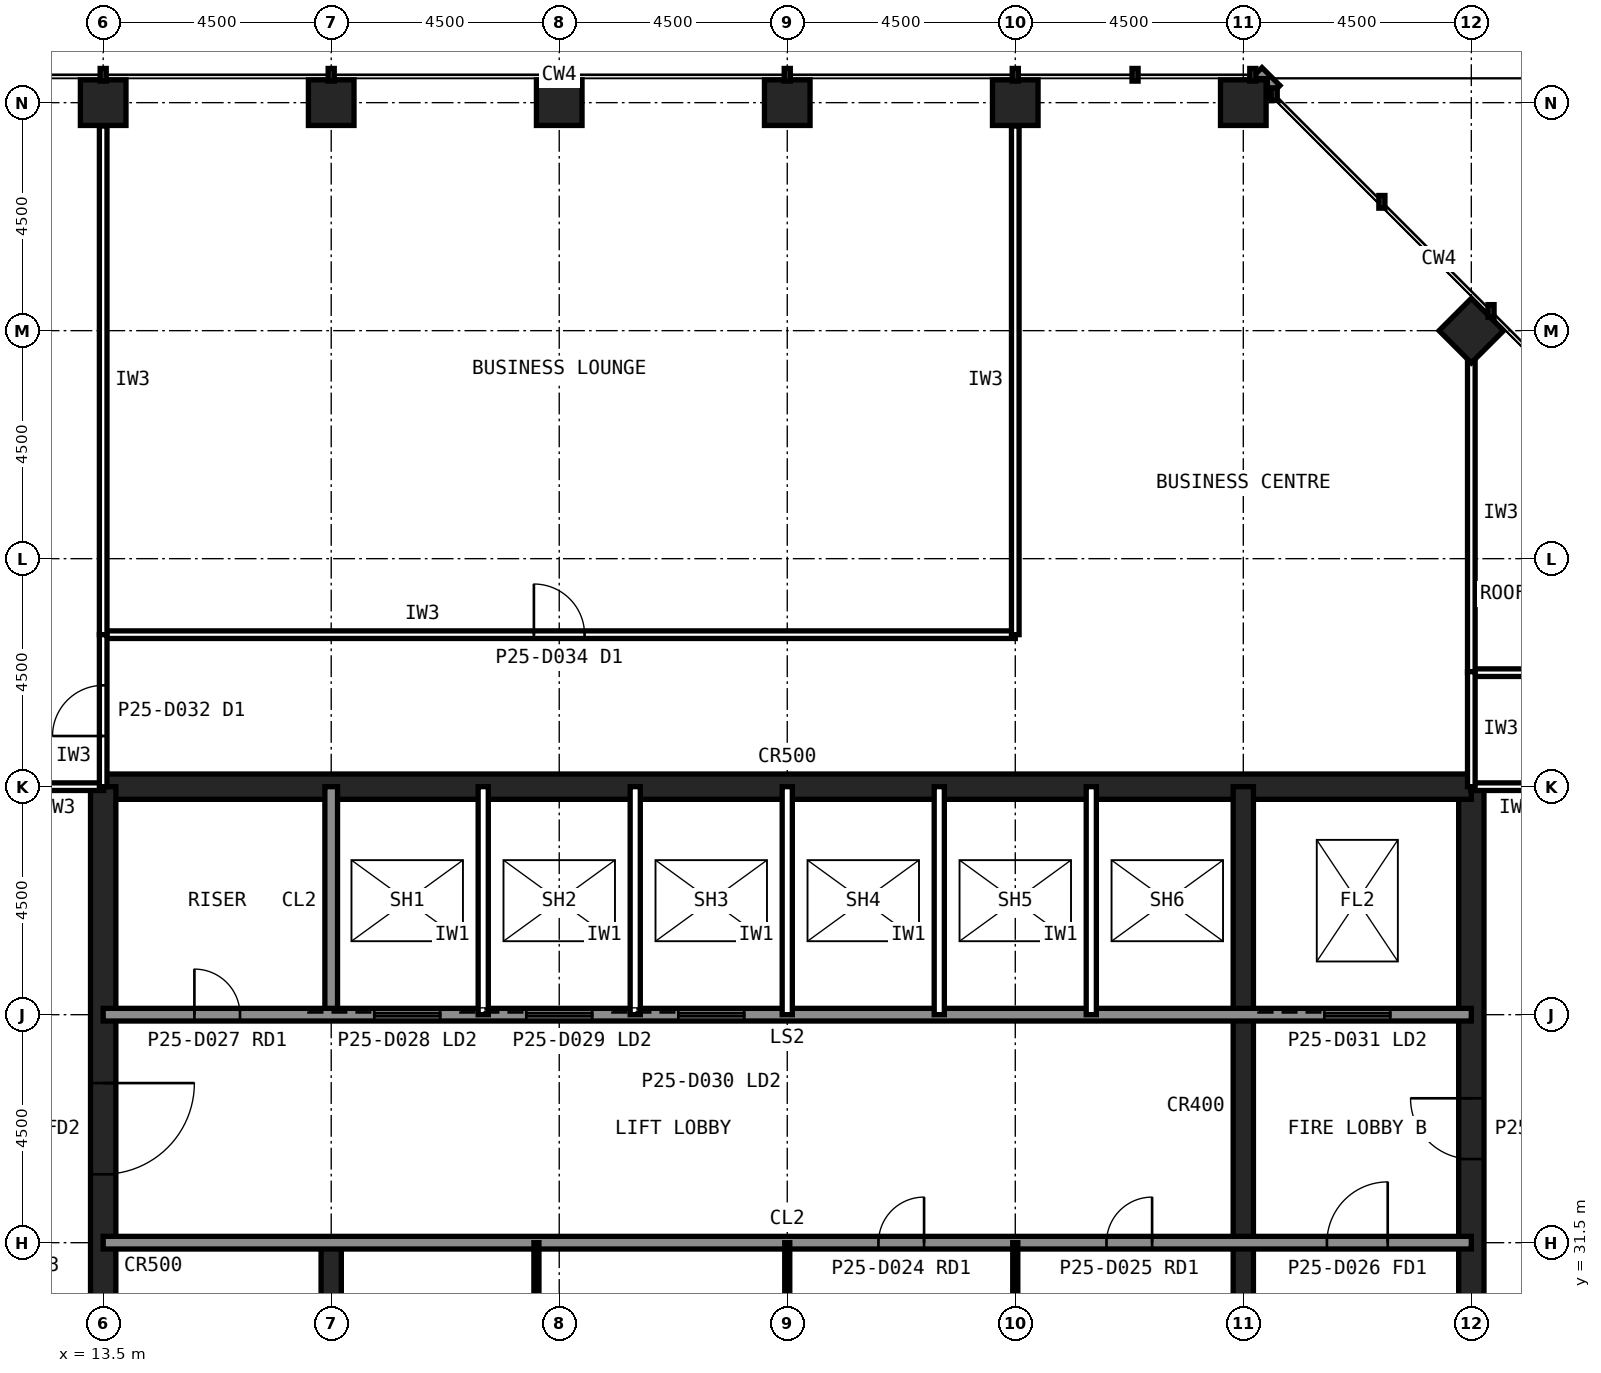
"""IFC4 building model, lengths in metres.
Left out: names, types, materials, properties, quantities, classifications, styles, units other than length and angle.
Written with IfcOpenShell. Run it as: python <this file> out.ifc"""

import sys

from ifc_helpers import new_model, si_unit, direction, frame, frame_2d, origin, origin_2d, place, context, subcontext, project, spatial, rectangle, hollow_rectangle, extrude, element, fill, save


model = new_model("IFC4")
c1 = context("Model", 3, precision=1e-05, world=origin(), true_north=direction((0.0, 1.0)))
c2 = subcontext(c1, "Body", "Model", "MODEL_VIEW")
j1 = project(units=[si_unit("LENGTHUNIT", "METRE"), si_unit("PLANEANGLEUNIT", "RADIAN")], contexts=[c1])
p1 = place(None, origin())
s1 = spatial("IfcSite", under=j1, at=p1, CompositionType="ELEMENT")
p2 = place(p1, origin())
s2 = spatial("IfcBuilding", under=s1, at=p2, CompositionType="ELEMENT")
p3 = place(p2, frame((0.0, 0.0, 110.6)))
s3 = spatial("IfcBuildingStorey", under=s2, at=p3, CompositionType="ELEMENT", Elevation=110.6)
for number, where, z_axis, x_axis in (
    (1, (36.0, 54.0, 0.0), (0.0, 0.0, 1.0), (1.0, 0.0, 0.0)),
    (2, (31.5, 54.0, 0.0), (0.0, 0.0, 1.0), (1.0, 0.0, 0.0)),
    (3, (27.0, 54.0, 0.0), (0.0, 0.0, 1.0), (1.0, 0.0, 0.0)),
    (4, (22.5, 54.0, 0.0), (0.0, 0.0, 1.0), (1.0, 0.0, 0.0)),
    (5, (18.0, 54.0, 0.0), (0.0, 0.0, 1.0), (1.0, 0.0, 0.0)),
    (6, (13.5, 54.0, 0.0), (0.0, 0.0, 1.0), (1.0, 0.0, 0.0)),
    (7, (40.5, 49.5, 0.0), (0.0, 0.0, 1.0), (0.707, 0.707, 0.0)),
):
    element("IfcColumn", number, at=place(p3, frame(where, z_axis=z_axis, x_axis=x_axis)), inside=s3, PredefinedType="COLUMN", context=c2, shape_type="SweptSolid", body=[
        extrude(hollow_rectangle(XDim=0.9, YDim=0.9, WallThickness=0.063, at=origin_2d()), origin(), (0.0, 0.0, 1.0), 5.0),
    ])
p4 = place(p3, frame((40.5, 13.5, 0.0), z_axis=(0.0, 0.0, 1.0), x_axis=(0.0, 1.0, 0.0)))
e8 = element("IfcWall", 8, at=p4, inside=s3, PredefinedType="SHEAR", context=c2, shape_type="SweptSolid", body=[
    extrude(rectangle(XDim=27.0, YDim=0.5, at=frame_2d((13.5, 0.0))), origin(), (0.0, 0.0, 1.0), 5.0),
])
p5 = place(p4, frame((5.85, 0.0, 0.0)))
e9 = element("IfcOpeningElement", 9, at=p5, cuts=e8, PredefinedType="OPENING", context=c2, shape_type="SweptSolid", body=[
    extrude(rectangle(XDim=1.8, YDim=2.1, at=frame_2d((0.9, 1.05))), frame((0.0, 0.26, 0.0), z_axis=(0.0, -1.0, 0.0), x_axis=(1.0, 0.0, 0.0)), (0.0, 0.0, 1.0), 0.52),
])
p6 = place(p4, frame((19.65, 0.0, 0.0)))
e10 = element("IfcOpeningElement", 10, at=p6, cuts=e8, PredefinedType="OPENING", context=c2, shape_type="SweptSolid", body=[
    extrude(rectangle(XDim=1.2, YDim=2.1, at=frame_2d((0.6, 1.05))), frame((0.0, 0.26, 0.0), z_axis=(0.0, -1.0, 0.0), x_axis=(1.0, 0.0, 0.0)), (0.0, 0.0, 1.0), 0.52),
])
p7 = place(p3, frame((40.5, 40.5, 0.0), z_axis=(0.0, 0.0, 1.0), x_axis=(-1.0, 0.0, 0.0)))
e11 = element("IfcWall", 11, at=p7, inside=s3, PredefinedType="SHEAR", context=c2, shape_type="SweptSolid", body=[
    extrude(rectangle(XDim=27.0, YDim=0.5, at=frame_2d((13.5, 0.0))), origin(), (0.0, 0.0, 1.0), 5.0),
])
p8 = place(p3, frame((13.5, 40.5, 0.0), z_axis=(0.0, 0.0, 1.0), x_axis=(0.0, -1.0, 0.0)))
e12 = element("IfcWall", 12, at=p8, inside=s3, PredefinedType="SHEAR", context=c2, shape_type="SweptSolid", body=[
    extrude(rectangle(XDim=27.0, YDim=0.5, at=frame_2d((13.5, 0.0))), origin(), (0.0, 0.0, 1.0), 5.0),
])
p9 = place(p8, frame((19.65, 0.0, 0.0)))
e13 = element("IfcOpeningElement", 13, at=p9, cuts=e12, PredefinedType="OPENING", context=c2, shape_type="SweptSolid", body=[
    extrude(rectangle(XDim=1.2, YDim=2.1, at=frame_2d((0.6, 1.05))), frame((0.0, 0.26, 0.0), z_axis=(0.0, -1.0, 0.0), x_axis=(1.0, 0.0, 0.0)), (0.0, 0.0, 1.0), 0.52),
])
p10 = place(p8, frame((5.85, 0.0, 0.0)))
e14 = element("IfcOpeningElement", 14, at=p10, cuts=e12, PredefinedType="OPENING", context=c2, shape_type="SweptSolid", body=[
    extrude(rectangle(XDim=1.8, YDim=2.1, at=frame_2d((0.9, 1.05))), frame((0.0, 0.26, 0.0), z_axis=(0.0, -1.0, 0.0), x_axis=(1.0, 0.0, 0.0)), (0.0, 0.0, 1.0), 0.52),
])
p11 = place(p3, frame((18.0, 13.5, 0.0), z_axis=(0.0, 0.0, 1.0), x_axis=(0.0, 1.0, 0.0)))
e15 = element("IfcWall", 15, at=p11, inside=s3, PredefinedType="SHEAR", context=c2, shape_type="SweptSolid", body=[
    extrude(rectangle(XDim=18.0, YDim=0.4, at=frame_2d((9.0, 0.0))), origin(), (0.0, 0.0, 1.0), 5.0),
])
p12 = place(p3, frame((18.0, 36.0, 0.0), z_axis=(0.0, 0.0, 1.0), x_axis=(0.0, 1.0, 0.0)))
e16 = element("IfcWall", 16, at=p12, inside=s3, PredefinedType="SOLIDWALL", context=c2, shape_type="SweptSolid", body=[
    extrude(rectangle(XDim=4.5, YDim=0.25, at=frame_2d((2.25, 0.0))), origin(), (0.0, 0.0, 1.0), 4.84),
])
p13 = place(p3, frame((36.0, 22.5, 0.0), z_axis=(0.0, 0.0, 1.0), x_axis=(0.0, 1.0, 0.0)))
e17 = element("IfcWall", 17, at=p13, inside=s3, PredefinedType="SHEAR", context=c2, shape_type="SweptSolid", body=[
    extrude(rectangle(XDim=18.0, YDim=0.4, at=frame_2d((9.0, 0.0))), origin(), (0.0, 0.0, 1.0), 5.0),
])
p14 = place(p3, frame((13.5, 36.0, 0.0), z_axis=(0.0, 0.0, 1.0), x_axis=(1.0, 0.0, 0.0)))
e18 = element("IfcWall", 18, at=p14, inside=s3, PredefinedType="SOLIDWALL", context=c2, shape_type="SweptSolid", body=[
    extrude(rectangle(XDim=27.0, YDim=0.25, at=frame_2d((13.5, 0.0))), origin(), (0.0, 0.0, 1.0), 4.84),
])
p15 = place(p14, frame((1.8, 0.0, 0.0)))
e19 = element("IfcOpeningElement", 19, at=p15, cuts=e18, PredefinedType="OPENING", context=c2, shape_type="SweptSolid", body=[
    extrude(rectangle(XDim=0.9, YDim=2.1, at=frame_2d((0.45, 1.05))), frame((0.0, 0.135, 0.0), z_axis=(0.0, -1.0, 0.0), x_axis=(1.0, 0.0, 0.0)), (0.0, 0.0, 1.0), 0.27),
])
p16 = place(p14, frame((5.35, 0.0, 0.0)))
e20 = element("IfcOpeningElement", 20, at=p16, cuts=e18, PredefinedType="OPENING", context=c2, shape_type="SweptSolid", body=[
    extrude(rectangle(XDim=1.3, YDim=2.2, at=frame_2d((0.65, 1.1))), frame((0.0, 0.135, 0.0), z_axis=(0.0, -1.0, 0.0), x_axis=(1.0, 0.0, 0.0)), (0.0, 0.0, 1.0), 0.27),
])
p17 = place(p14, frame((8.35, 0.0, 0.0)))
e21 = element("IfcOpeningElement", 21, at=p17, cuts=e18, PredefinedType="OPENING", context=c2, shape_type="SweptSolid", body=[
    extrude(rectangle(XDim=1.3, YDim=2.2, at=frame_2d((0.65, 1.1))), frame((0.0, 0.135, 0.0), z_axis=(0.0, -1.0, 0.0), x_axis=(1.0, 0.0, 0.0)), (0.0, 0.0, 1.0), 0.27),
])
p18 = place(p14, frame((11.35, 0.0, 0.0)))
e22 = element("IfcOpeningElement", 22, at=p18, cuts=e18, PredefinedType="OPENING", context=c2, shape_type="SweptSolid", body=[
    extrude(rectangle(XDim=1.3, YDim=2.2, at=frame_2d((0.65, 1.1))), frame((0.0, 0.135, 0.0), z_axis=(0.0, -1.0, 0.0), x_axis=(1.0, 0.0, 0.0)), (0.0, 0.0, 1.0), 0.27),
])
p19 = place(p14, frame((24.1, 0.0, 0.0)))
e23 = element("IfcOpeningElement", 23, at=p19, cuts=e18, PredefinedType="OPENING", context=c2, shape_type="SweptSolid", body=[
    extrude(rectangle(XDim=1.3, YDim=2.2, at=frame_2d((0.65, 1.1))), frame((0.0, 0.135, 0.0), z_axis=(0.0, -1.0, 0.0), x_axis=(1.0, 0.0, 0.0)), (0.0, 0.0, 1.0), 0.27),
])
p20 = place(p3, frame((13.5, 31.5, 0.0), z_axis=(0.0, 0.0, 1.0), x_axis=(1.0, 0.0, 0.0)))
e24 = element("IfcWall", 24, at=p20, inside=s3, PredefinedType="SOLIDWALL", context=c2, shape_type="SweptSolid", body=[
    extrude(rectangle(XDim=27.0, YDim=0.25, at=frame_2d((13.5, 0.0))), origin(), (0.0, 0.0, 1.0), 4.84),
])
p21 = place(p20, frame((24.15, 0.0, 0.0)))
e25 = element("IfcOpeningElement", 25, at=p21, cuts=e24, PredefinedType="OPENING", context=c2, shape_type="SweptSolid", body=[
    extrude(rectangle(XDim=1.2, YDim=2.1, at=frame_2d((0.6, 1.05))), frame((0.0, 0.135, 0.0), z_axis=(0.0, -1.0, 0.0), x_axis=(1.0, 0.0, 0.0)), (0.0, 0.0, 1.0), 0.27),
])
p22 = place(p20, frame((15.3, 0.0, 0.0)))
e26 = element("IfcOpeningElement", 26, at=p22, cuts=e24, PredefinedType="OPENING", context=c2, shape_type="SweptSolid", body=[
    extrude(rectangle(XDim=0.9, YDim=2.1, at=frame_2d((0.45, 1.05))), frame((0.0, 0.135, 0.0), z_axis=(0.0, -1.0, 0.0), x_axis=(1.0, 0.0, 0.0)), (0.0, 0.0, 1.0), 0.27),
])
p23 = place(p20, frame((19.8, 0.0, 0.0)))
e27 = element("IfcOpeningElement", 27, at=p23, cuts=e24, PredefinedType="OPENING", context=c2, shape_type="SweptSolid", body=[
    extrude(rectangle(XDim=0.9, YDim=2.1, at=frame_2d((0.45, 1.05))), frame((0.0, 0.135, 0.0), z_axis=(0.0, -1.0, 0.0), x_axis=(1.0, 0.0, 0.0)), (0.0, 0.0, 1.0), 0.27),
])
for number, where, z_axis, x_axis in (
    (28, (21.0, 36.0, 0.0), (0.0, 0.0, 1.0), (0.0, 1.0, 0.0)),
    (29, (24.0, 36.0, 0.0), (0.0, 0.0, 1.0), (0.0, 1.0, 0.0)),
    (30, (27.0, 36.0, 0.0), (0.0, 0.0, 1.0), (0.0, 1.0, 0.0)),
    (31, (30.0, 36.0, 0.0), (0.0, 0.0, 1.0), (0.0, 1.0, 0.0)),
    (32, (33.0, 36.0, 0.0), (0.0, 0.0, 1.0), (0.0, 1.0, 0.0)),
):
    element("IfcWall", number, at=place(p3, frame(where, z_axis=z_axis, x_axis=x_axis)), inside=s3, PredefinedType="PARTITIONING", context=c2, shape_type="SweptSolid", body=[
        extrude(rectangle(XDim=4.5, YDim=0.2, at=frame_2d((2.25, 0.0))), origin(), (0.0, 0.0, 1.0), 4.84),
    ])
for number, where, z_axis, x_axis in (
    (33, (22.05, 22.5, 0.0), (0.0, 0.0, 1.0), (0.0, 1.0, 0.0)),
    (34, (27.0, 22.5, 0.0), (0.0, 0.0, 1.0), (0.0, 1.0, 0.0)),
    (35, (31.5, 22.5, 0.0), (0.0, 0.0, 1.0), (0.0, 1.0, 0.0)),
):
    element("IfcWall", number, at=place(p3, frame(where, z_axis=z_axis, x_axis=x_axis)), inside=s3, PredefinedType="PLUMBINGWALL", context=c2, shape_type="SweptSolid", body=[
        extrude(rectangle(XDim=9.0, YDim=0.1, at=frame_2d((4.5, 0.0))), origin(), (0.0, 0.0, 1.0), 4.84),
    ])
for number, where, z_axis, x_axis in (
    (36, (13.51, 40.5, 0.0), (0.0, 0.0, 1.0), (-1.0, 0.0, 0.0)),
    (37, (42.3, 40.5, 0.0), (0.0, 0.0, 1.0), (-1.0, 0.0, 0.0)),
):
    element("IfcWall", number, at=place(p3, frame(where, z_axis=z_axis, x_axis=x_axis)), inside=s3, PredefinedType="PARTITIONING", context=c2, shape_type="SweptSolid", body=[
        extrude(rectangle(XDim=1.81, YDim=0.15, at=frame_2d((0.905, 0.0))), origin(), (0.0, 0.0, 1.0), 3.989),
    ])
p24 = place(p3, frame((13.5, 43.5, 0.0), z_axis=(0.0, 0.0, 1.0), x_axis=(1.0, 0.0, 0.0)))
e38 = element("IfcWall", 38, at=p24, inside=s3, PredefinedType="PARTITIONING", context=c2, shape_type="SweptSolid", body=[
    extrude(rectangle(XDim=18.0, YDim=0.15, at=frame_2d((9.0, 0.0))), origin(), (0.0, 0.0, 1.0), 4.84),
])
p25 = place(p24, frame((8.5, 0.0, 0.0)))
e39 = element("IfcOpeningElement", 39, at=p25, cuts=e38, PredefinedType="OPENING", context=c2, shape_type="SweptSolid", body=[
    extrude(rectangle(XDim=1.0, YDim=2.1, at=frame_2d((0.5, 1.05))), frame((0.0, 0.085, 0.0), z_axis=(0.0, -1.0, 0.0), x_axis=(1.0, 0.0, 0.0)), (0.0, 0.0, 1.0), 0.17),
])
for number, where, z_axis, x_axis in (
    (40, (31.5, 43.5, 0.0), (0.0, 0.0, 1.0), (0.0, 1.0, 0.0)),
    (41, (13.5, 53.54, 0.0), (0.0, 0.0, 1.0), (0.0, -1.0, 0.0)),
):
    element("IfcWall", number, at=place(p3, frame(where, z_axis=z_axis, x_axis=x_axis)), inside=s3, PredefinedType="PARTITIONING", context=c2, shape_type="SweptSolid", body=[
        extrude(rectangle(XDim=10.04, YDim=0.15, at=frame_2d((5.02, 0.0))), origin(), (0.0, 0.0, 1.0), 3.989),
    ])
p26 = place(p3, frame((40.5, 42.75, 0.0), z_axis=(0.0, 0.0, 1.0), x_axis=(1.0, 0.0, 0.0)))
e42 = element("IfcWall", 42, at=p26, inside=s3, PredefinedType="PARTITIONING", context=c2, shape_type="SweptSolid", body=[
    extrude(rectangle(XDim=7.485, YDim=0.15, at=frame_2d((3.743, 0.0))), origin(), (0.0, 0.0, 1.0), 4.84),
])
p27 = place(p26, frame((2.868, 0.0, 0.0)))
e43 = element("IfcOpeningElement", 43, at=p27, cuts=e42, PredefinedType="OPENING", context=c2, shape_type="SweptSolid", body=[
    extrude(rectangle(XDim=1.0, YDim=2.1, at=frame_2d((0.5, 1.05))), frame((0.0, 0.085, 0.0), z_axis=(0.0, -1.0, 0.0), x_axis=(1.0, 0.0, 0.0)), (0.0, 0.0, 1.0), 0.17),
])
p28 = place(p3, frame((40.5, 49.04, 0.0), z_axis=(0.0, 0.0, 1.0), x_axis=(0.0, -1.0, 0.0)))
e44 = element("IfcWall", 44, at=p28, inside=s3, PredefinedType="PARTITIONING", context=c2, shape_type="SweptSolid", body=[
    extrude(rectangle(XDim=6.29, YDim=0.15, at=frame_2d((3.145, 0.0))), origin(), (0.0, 0.0, 1.0), 3.989),
])
p29 = place(p3, frame((40.5, 42.77, 0.0), z_axis=(0.0, 0.0, 1.0), x_axis=(0.0, -1.0, 0.0)))
e45 = element("IfcWall", 45, at=p29, inside=s3, PredefinedType="PARTITIONING", context=c2, shape_type="SweptSolid", body=[
    extrude(rectangle(XDim=2.27, YDim=0.15, at=frame_2d((1.135, 0.0))), origin(), (0.0, 0.0, 1.0), 3.989),
])
p30 = place(p3, frame((13.5, 40.5, 0.0), z_axis=(0.0, 0.0, 1.0), x_axis=(0.0, 1.0, 0.0)))
e46 = element("IfcWall", 46, at=p30, inside=s3, PredefinedType="PARTITIONING", context=c2, shape_type="SweptSolid", body=[
    extrude(rectangle(XDim=3.0, YDim=0.15, at=frame_2d((1.5, 0.0))), origin(), (0.0, 0.0, 1.0), 3.989),
])
p31 = place(p30, frame((1.0, 0.0, 0.0)))
e47 = element("IfcOpeningElement", 47, at=p31, cuts=e46, PredefinedType="OPENING", context=c2, shape_type="SweptSolid", body=[
    extrude(rectangle(XDim=1.0, YDim=2.1, at=frame_2d((0.5, 1.05))), frame((0.0, 0.085, 0.0), z_axis=(0.0, -1.0, 0.0), x_axis=(1.0, 0.0, 0.0)), (0.0, 0.0, 1.0), 0.17),
])
p32 = place(p10, origin())
e48 = element("IfcDoor", 48, at=p32, inside=s3, OperationType="SINGLE_SWING_LEFT", PredefinedType="DOOR", context=c2, shape_type="SweptSolid", body=[
    extrude(rectangle(XDim=1.8, YDim=2.1, at=frame_2d((0.9, 1.05))), frame((0.0, 0.025, 0.0), z_axis=(0.0, -1.0, 0.0), x_axis=(1.0, 0.0, 0.0)), (0.0, 0.0, 1.0), 0.05),
])
fill(e14, e48)
p33 = place(p6, origin())
e49 = element("IfcDoor", 49, at=p33, inside=s3, OperationType="SINGLE_SWING_RIGHT", PredefinedType="DOOR", context=c2, shape_type="SweptSolid", body=[
    extrude(rectangle(XDim=1.2, YDim=2.1, at=frame_2d((0.6, 1.05))), frame((0.0, 0.025, 0.0), z_axis=(0.0, -1.0, 0.0), x_axis=(1.0, 0.0, 0.0)), (0.0, 0.0, 1.0), 0.05),
])
fill(e10, e49)
p34 = place(p21, origin())
e50 = element("IfcDoor", 50, at=p34, inside=s3, OperationType="SINGLE_SWING_RIGHT", PredefinedType="DOOR", context=c2, shape_type="SweptSolid", body=[
    extrude(rectangle(XDim=1.2, YDim=2.1, at=frame_2d((0.6, 1.05))), frame((0.0, 0.025, 0.0), z_axis=(0.0, -1.0, 0.0), x_axis=(1.0, 0.0, 0.0)), (0.0, 0.0, 1.0), 0.05),
])
fill(e25, e50)
p35 = place(p22, origin())
e51 = element("IfcDoor", 51, at=p35, inside=s3, OperationType="SINGLE_SWING_RIGHT", PredefinedType="DOOR", context=c2, shape_type="SweptSolid", body=[
    extrude(rectangle(XDim=0.9, YDim=2.1, at=frame_2d((0.45, 1.05))), frame((0.0, 0.025, 0.0), z_axis=(0.0, -1.0, 0.0), x_axis=(1.0, 0.0, 0.0)), (0.0, 0.0, 1.0), 0.05),
])
fill(e26, e51)
p36 = place(p23, origin())
e52 = element("IfcDoor", 52, at=p36, inside=s3, OperationType="SINGLE_SWING_RIGHT", PredefinedType="DOOR", context=c2, shape_type="SweptSolid", body=[
    extrude(rectangle(XDim=0.9, YDim=2.1, at=frame_2d((0.45, 1.05))), frame((0.0, 0.025, 0.0), z_axis=(0.0, -1.0, 0.0), x_axis=(1.0, 0.0, 0.0)), (0.0, 0.0, 1.0), 0.05),
])
fill(e27, e52)
p37 = place(p15, origin())
e53 = element("IfcDoor", 53, at=p37, inside=s3, OperationType="SINGLE_SWING_LEFT", PredefinedType="DOOR", context=c2, shape_type="SweptSolid", body=[
    extrude(rectangle(XDim=0.9, YDim=2.1, at=frame_2d((0.45, 1.05))), frame((0.0, 0.025, 0.0), z_axis=(0.0, -1.0, 0.0), x_axis=(1.0, 0.0, 0.0)), (0.0, 0.0, 1.0), 0.05),
])
fill(e19, e53)
p38 = place(p16, origin())
e54 = element("IfcDoor", 54, at=p38, inside=s3, OperationType="SLIDING_TO_LEFT", PredefinedType="DOOR", context=c2, shape_type="SweptSolid", body=[
    extrude(rectangle(XDim=1.3, YDim=2.2, at=frame_2d((0.65, 1.1))), frame((0.0, 0.025, 0.0), z_axis=(0.0, -1.0, 0.0), x_axis=(1.0, 0.0, 0.0)), (0.0, 0.0, 1.0), 0.05),
])
fill(e20, e54)
p39 = place(p17, origin())
e55 = element("IfcDoor", 55, at=p39, inside=s3, OperationType="SLIDING_TO_LEFT", PredefinedType="DOOR", context=c2, shape_type="SweptSolid", body=[
    extrude(rectangle(XDim=1.3, YDim=2.2, at=frame_2d((0.65, 1.1))), frame((0.0, 0.025, 0.0), z_axis=(0.0, -1.0, 0.0), x_axis=(1.0, 0.0, 0.0)), (0.0, 0.0, 1.0), 0.05),
])
fill(e21, e55)
p40 = place(p18, origin())
e56 = element("IfcDoor", 56, at=p40, inside=s3, OperationType="SLIDING_TO_LEFT", PredefinedType="DOOR", context=c2, shape_type="SweptSolid", body=[
    extrude(rectangle(XDim=1.3, YDim=2.2, at=frame_2d((0.65, 1.1))), frame((0.0, 0.025, 0.0), z_axis=(0.0, -1.0, 0.0), x_axis=(1.0, 0.0, 0.0)), (0.0, 0.0, 1.0), 0.05),
])
fill(e22, e56)
p41 = place(p19, origin())
e57 = element("IfcDoor", 57, at=p41, inside=s3, OperationType="SLIDING_TO_LEFT", PredefinedType="DOOR", context=c2, shape_type="SweptSolid", body=[
    extrude(rectangle(XDim=1.3, YDim=2.2, at=frame_2d((0.65, 1.1))), frame((0.0, 0.025, 0.0), z_axis=(0.0, -1.0, 0.0), x_axis=(1.0, 0.0, 0.0)), (0.0, 0.0, 1.0), 0.05),
])
fill(e23, e57)
p42 = place(p25, origin())
e58 = element("IfcDoor", 58, at=p42, inside=s3, OperationType="SINGLE_SWING_LEFT", PredefinedType="DOOR", context=c2, shape_type="SweptSolid", body=[
    extrude(rectangle(XDim=1.0, YDim=2.1, at=frame_2d((0.5, 1.05))), frame((0.0, 0.025, 0.0), z_axis=(0.0, -1.0, 0.0), x_axis=(1.0, 0.0, 0.0)), (0.0, 0.0, 1.0), 0.05),
])
fill(e39, e58)
p43 = place(p31, origin())
e59 = element("IfcDoor", 59, at=p43, inside=s3, OperationType="SINGLE_SWING_LEFT", PredefinedType="DOOR", context=c2, shape_type="SweptSolid", body=[
    extrude(rectangle(XDim=1.0, YDim=2.1, at=frame_2d((0.5, 1.05))), frame((0.0, 0.025, 0.0), z_axis=(0.0, -1.0, 0.0), x_axis=(1.0, 0.0, 0.0)), (0.0, 0.0, 1.0), 0.05),
])
fill(e47, e59)
save(model, sys.argv[1])
